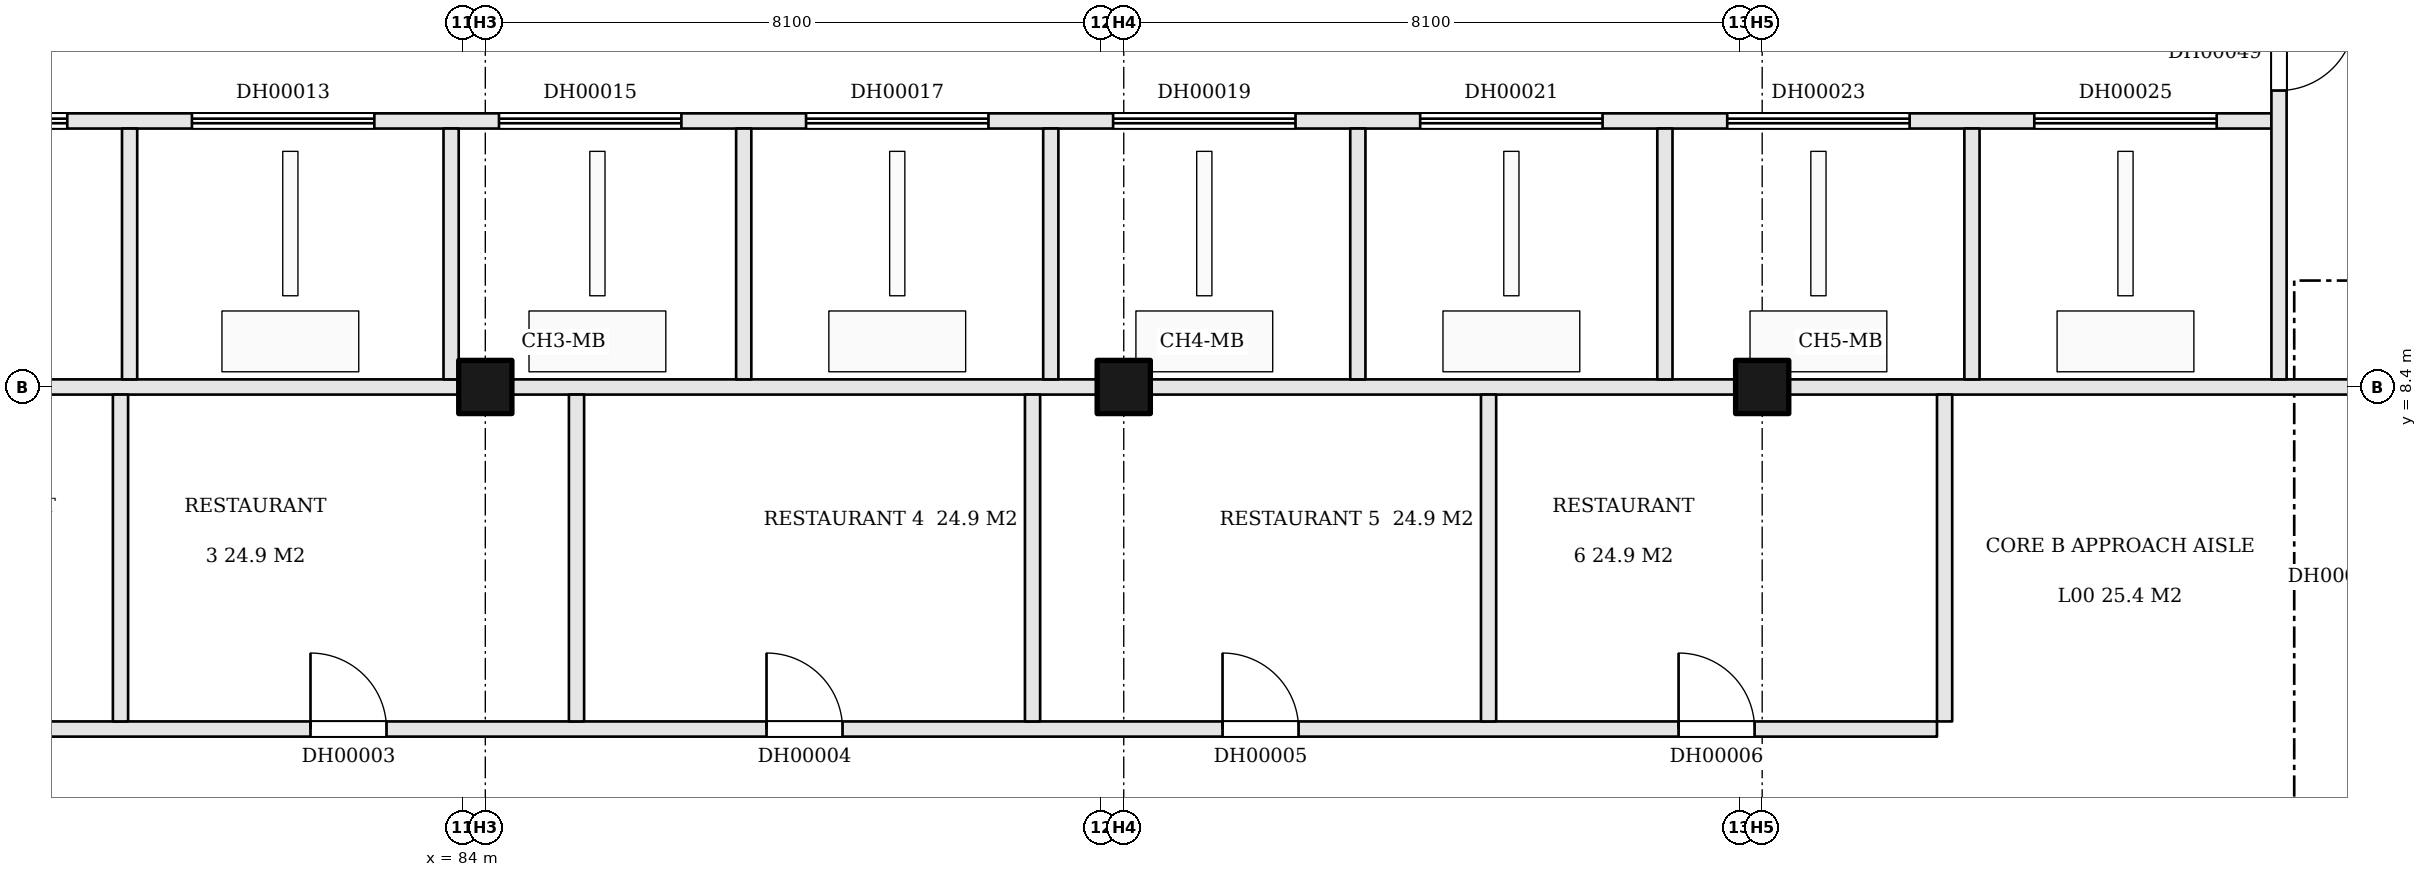
"""IFC4 building model, lengths in metres.
Left out: names, types, materials, properties, quantities, classifications, styles, units other than length and angle.
Written with IfcOpenShell. Run it as: python <this file> out.ifc"""

import sys

from ifc_helpers import new_model, si_unit, direction, frame, frame_2d, origin, origin_2d, place, context, subcontext, project, spatial, rectangle, extrude, element, fill, save


model = new_model("IFC4")
c1 = context("Model", 3, precision=1e-05, world=origin(), true_north=direction((0.0, 1.0)))
c2 = subcontext(c1, "Body", "Model", "MODEL_VIEW")
j1 = project(units=[si_unit("LENGTHUNIT", "METRE"), si_unit("PLANEANGLEUNIT", "RADIAN")], contexts=[c1])
p1 = place(None, origin())
s1 = spatial("IfcSite", under=j1, at=p1, CompositionType="ELEMENT")
p2 = place(p1, origin())
s2 = spatial("IfcBuilding", under=s1, at=p2, CompositionType="ELEMENT")
p3 = place(p2, origin())
s3 = spatial("IfcBuildingStorey", under=s2, at=p3, CompositionType="ELEMENT", Elevation=0.0)
for number, where, z_axis, x_axis in (
    (1, (84.3, 8.4, -0.2), (0.0, 0.0, 1.0), (1.0, 0.0, 0.0)),
    (2, (92.7, 8.4, -0.2), (0.0, 0.0, 1.0), (1.0, 0.0, 0.0)),
    (3, (101.1, 8.4, -0.2), (0.0, 0.0, 1.0), (1.0, 0.0, 0.0)),
):
    element("IfcColumn", number, at=place(p3, frame(where, z_axis=z_axis, x_axis=x_axis)), inside=s3, PredefinedType="COLUMN", context=c2, shape_type="SweptSolid", body=[
        extrude(rectangle(XDim=0.7, YDim=0.7, at=origin_2d()), origin(), (0.0, 0.0, 1.0), 8.9),
    ])
p4 = place(p3, frame((68.35, 3.9, 0.0), z_axis=(0.0, 0.0, 1.0), x_axis=(1.0, 0.0, 0.0)))
e4 = element("IfcWall", 4, at=p4, inside=s3, PredefinedType="PARTITIONING", context=c2, shape_type="SweptSolid", body=[
    extrude(rectangle(XDim=35.05, YDim=0.2, at=frame_2d((17.525, 0.0))), origin(), (0.0, 0.0, 1.0), 8.7),
])
p5 = place(p4, frame((1.65, 0.0, 0.0)))
e5 = element("IfcOpeningElement", 5, at=p5, cuts=e4, PredefinedType="OPENING", context=c2, shape_type="SweptSolid", body=[
    extrude(rectangle(XDim=1.0, YDim=2.1, at=frame_2d((0.5, 1.05))), frame((0.0, 0.11, 0.0), z_axis=(0.0, -1.0, 0.0), x_axis=(1.0, 0.0, 0.0)), (0.0, 0.0, 1.0), 0.22),
])
p6 = place(p4, frame((7.65, 0.0, 0.0)))
e6 = element("IfcOpeningElement", 6, at=p6, cuts=e4, PredefinedType="OPENING", context=c2, shape_type="SweptSolid", body=[
    extrude(rectangle(XDim=1.0, YDim=2.1, at=frame_2d((0.5, 1.05))), frame((0.0, 0.11, 0.0), z_axis=(0.0, -1.0, 0.0), x_axis=(1.0, 0.0, 0.0)), (0.0, 0.0, 1.0), 0.22),
])
p7 = place(p4, frame((13.65, 0.0, 0.0)))
e7 = element("IfcOpeningElement", 7, at=p7, cuts=e4, PredefinedType="OPENING", context=c2, shape_type="SweptSolid", body=[
    extrude(rectangle(XDim=1.0, YDim=2.1, at=frame_2d((0.5, 1.05))), frame((0.0, 0.11, 0.0), z_axis=(0.0, -1.0, 0.0), x_axis=(1.0, 0.0, 0.0)), (0.0, 0.0, 1.0), 0.22),
])
p8 = place(p4, frame((19.65, 0.0, 0.0)))
e8 = element("IfcOpeningElement", 8, at=p8, cuts=e4, PredefinedType="OPENING", context=c2, shape_type="SweptSolid", body=[
    extrude(rectangle(XDim=1.0, YDim=2.1, at=frame_2d((0.5, 1.05))), frame((0.0, 0.11, 0.0), z_axis=(0.0, -1.0, 0.0), x_axis=(1.0, 0.0, 0.0)), (0.0, 0.0, 1.0), 0.22),
])
p9 = place(p4, frame((25.65, 0.0, 0.0)))
e9 = element("IfcOpeningElement", 9, at=p9, cuts=e4, PredefinedType="OPENING", context=c2, shape_type="SweptSolid", body=[
    extrude(rectangle(XDim=1.0, YDim=2.1, at=frame_2d((0.5, 1.05))), frame((0.0, 0.11, 0.0), z_axis=(0.0, -1.0, 0.0), x_axis=(1.0, 0.0, 0.0)), (0.0, 0.0, 1.0), 0.22),
])
p10 = place(p4, frame((31.65, 0.0, 0.0)))
e10 = element("IfcOpeningElement", 10, at=p10, cuts=e4, PredefinedType="OPENING", context=c2, shape_type="SweptSolid", body=[
    extrude(rectangle(XDim=1.0, YDim=2.1, at=frame_2d((0.5, 1.05))), frame((0.0, 0.11, 0.0), z_axis=(0.0, -1.0, 0.0), x_axis=(1.0, 0.0, 0.0)), (0.0, 0.0, 1.0), 0.22),
])
p11 = place(p3, frame((76.25, 8.4, 0.0), z_axis=(0.0, 0.0, 1.0), x_axis=(1.0, 0.0, 0.0)))
e11 = element("IfcWall", 11, at=p11, inside=s3, PredefinedType="PARTITIONING", context=c2, shape_type="SweptSolid", body=[
    extrude(rectangle(XDim=7.7, YDim=0.2, at=frame_2d((3.85, 0.0))), origin(), (0.0, 0.0, 1.0), 8.7),
])
p12 = place(p3, frame((84.65, 8.4, 0.0), z_axis=(0.0, 0.0, 1.0), x_axis=(1.0, 0.0, 0.0)))
e12 = element("IfcWall", 12, at=p12, inside=s3, PredefinedType="PARTITIONING", context=c2, shape_type="SweptSolid", body=[
    extrude(rectangle(XDim=7.7, YDim=0.2, at=frame_2d((3.85, 0.0))), origin(), (0.0, 0.0, 1.0), 8.7),
])
for number, where, z_axis, x_axis in (
    (13, (93.05, 8.4, 0.0), (0.0, 0.0, 1.0), (1.0, 0.0, 0.0)),
    (14, (101.45, 8.4, 0.0), (0.0, 0.0, 1.0), (1.0, 0.0, 0.0)),
):
    element("IfcWall", number, at=place(p3, frame(where, z_axis=z_axis, x_axis=x_axis)), inside=s3, PredefinedType="PARTITIONING", context=c2, shape_type="SweptSolid", body=[
        extrude(rectangle(XDim=7.7, YDim=0.2, at=frame_2d((3.85, 0.0))), origin(), (0.0, 0.0, 1.0), 8.7),
    ])
p13 = place(p3, frame((68.35, 11.9, 0.0), z_axis=(0.0, 0.0, 1.0), x_axis=(1.0, 0.0, 0.0)))
e15 = element("IfcWall", 15, at=p13, inside=s3, PredefinedType="PARTITIONING", context=c2, shape_type="SweptSolid", body=[
    extrude(rectangle(XDim=39.45, YDim=0.2, at=frame_2d((19.725, 0.0))), origin(), (0.0, 0.0, 1.0), 8.7),
])
p14 = place(p13, frame((0.2, 0.0, 0.0)))
e16 = element("IfcOpeningElement", 16, at=p14, cuts=e15, PredefinedType="OPENING", context=c2, shape_type="SweptSolid", body=[
    extrude(rectangle(XDim=2.4, YDim=2.4, at=frame_2d((1.2, 1.2))), frame((0.0, 0.11, 0.0), z_axis=(0.0, -1.0, 0.0), x_axis=(1.0, 0.0, 0.0)), (0.0, 0.0, 1.0), 0.22),
])
p15 = place(p13, frame((4.01, 0.0, 0.0)))
e17 = element("IfcOpeningElement", 17, at=p15, cuts=e15, PredefinedType="OPENING", context=c2, shape_type="SweptSolid", body=[
    extrude(rectangle(XDim=2.4, YDim=2.4, at=frame_2d((1.2, 1.2))), frame((0.0, 0.11, 0.0), z_axis=(0.0, -1.0, 0.0), x_axis=(1.0, 0.0, 0.0)), (0.0, 0.0, 1.0), 0.22),
])
p16 = place(p13, frame((8.05, 0.0, 0.0)))
e18 = element("IfcOpeningElement", 18, at=p16, cuts=e15, PredefinedType="OPENING", context=c2, shape_type="SweptSolid", body=[
    extrude(rectangle(XDim=2.4, YDim=2.4, at=frame_2d((1.2, 1.2))), frame((0.0, 0.11, 0.0), z_axis=(0.0, -1.0, 0.0), x_axis=(1.0, 0.0, 0.0)), (0.0, 0.0, 1.0), 0.22),
])
p17 = place(p13, frame((12.09, 0.0, 0.0)))
e19 = element("IfcOpeningElement", 19, at=p17, cuts=e15, PredefinedType="OPENING", context=c2, shape_type="SweptSolid", body=[
    extrude(rectangle(XDim=2.4, YDim=2.4, at=frame_2d((1.2, 1.2))), frame((0.0, 0.11, 0.0), z_axis=(0.0, -1.0, 0.0), x_axis=(1.0, 0.0, 0.0)), (0.0, 0.0, 1.0), 0.22),
])
p18 = place(p13, frame((16.13, 0.0, 0.0)))
e20 = element("IfcOpeningElement", 20, at=p18, cuts=e15, PredefinedType="OPENING", context=c2, shape_type="SweptSolid", body=[
    extrude(rectangle(XDim=2.4, YDim=2.4, at=frame_2d((1.2, 1.2))), frame((0.0, 0.11, 0.0), z_axis=(0.0, -1.0, 0.0), x_axis=(1.0, 0.0, 0.0)), (0.0, 0.0, 1.0), 0.22),
])
p19 = place(p13, frame((20.17, 0.0, 0.0)))
e21 = element("IfcOpeningElement", 21, at=p19, cuts=e15, PredefinedType="OPENING", context=c2, shape_type="SweptSolid", body=[
    extrude(rectangle(XDim=2.4, YDim=2.4, at=frame_2d((1.2, 1.2))), frame((0.0, 0.11, 0.0), z_axis=(0.0, -1.0, 0.0), x_axis=(1.0, 0.0, 0.0)), (0.0, 0.0, 1.0), 0.22),
])
p20 = place(p13, frame((24.21, 0.0, 0.0)))
e22 = element("IfcOpeningElement", 22, at=p20, cuts=e15, PredefinedType="OPENING", context=c2, shape_type="SweptSolid", body=[
    extrude(rectangle(XDim=2.4, YDim=2.4, at=frame_2d((1.2, 1.2))), frame((0.0, 0.11, 0.0), z_axis=(0.0, -1.0, 0.0), x_axis=(1.0, 0.0, 0.0)), (0.0, 0.0, 1.0), 0.22),
])
p21 = place(p13, frame((28.25, 0.0, 0.0)))
e23 = element("IfcOpeningElement", 23, at=p21, cuts=e15, PredefinedType="OPENING", context=c2, shape_type="SweptSolid", body=[
    extrude(rectangle(XDim=2.4, YDim=2.4, at=frame_2d((1.2, 1.2))), frame((0.0, 0.11, 0.0), z_axis=(0.0, -1.0, 0.0), x_axis=(1.0, 0.0, 0.0)), (0.0, 0.0, 1.0), 0.22),
])
p22 = place(p13, frame((32.29, 0.0, 0.0)))
e24 = element("IfcOpeningElement", 24, at=p22, cuts=e15, PredefinedType="OPENING", context=c2, shape_type="SweptSolid", body=[
    extrude(rectangle(XDim=2.4, YDim=2.4, at=frame_2d((1.2, 1.2))), frame((0.0, 0.11, 0.0), z_axis=(0.0, -1.0, 0.0), x_axis=(1.0, 0.0, 0.0)), (0.0, 0.0, 1.0), 0.22),
])
p23 = place(p13, frame((36.33, 0.0, 0.0)))
e25 = element("IfcOpeningElement", 25, at=p23, cuts=e15, PredefinedType="OPENING", context=c2, shape_type="SweptSolid", body=[
    extrude(rectangle(XDim=2.4, YDim=2.4, at=frame_2d((1.2, 1.2))), frame((0.0, 0.11, 0.0), z_axis=(0.0, -1.0, 0.0), x_axis=(1.0, 0.0, 0.0)), (0.0, 0.0, 1.0), 0.22),
])
p24 = place(p3, frame((79.5, 4.0, 0.0), z_axis=(0.0, 0.0, 1.0), x_axis=(0.0, 1.0, 0.0)))
e26 = element("IfcWall", 26, at=p24, inside=s3, PredefinedType="PARTITIONING", context=c2, shape_type="SweptSolid", body=[
    extrude(rectangle(XDim=4.3, YDim=0.2, at=frame_2d((2.15, 0.0))), origin(), (0.0, 0.0, 1.0), 8.7),
])
for number, where, z_axis, x_axis in (
    (27, (79.62, 8.5, 0.0), (0.0, 0.0, 1.0), (0.0, 1.0, 0.0)),
    (28, (83.85, 8.5, 0.0), (0.0, 0.0, 1.0), (0.0, 1.0, 0.0)),
):
    element("IfcWall", number, at=place(p3, frame(where, z_axis=z_axis, x_axis=x_axis)), inside=s3, PredefinedType="PARTITIONING", context=c2, shape_type="SweptSolid", body=[
        extrude(rectangle(XDim=3.3, YDim=0.2, at=frame_2d((1.65, 0.0))), origin(), (0.0, 0.0, 1.0), 8.7),
    ])
p25 = place(p3, frame((85.5, 4.0, 0.0), z_axis=(0.0, 0.0, 1.0), x_axis=(0.0, 1.0, 0.0)))
e29 = element("IfcWall", 29, at=p25, inside=s3, PredefinedType="PARTITIONING", context=c2, shape_type="SweptSolid", body=[
    extrude(rectangle(XDim=4.3, YDim=0.2, at=frame_2d((2.15, 0.0))), origin(), (0.0, 0.0, 1.0), 8.7),
])
p26 = place(p3, frame((87.7, 8.5, 0.0), z_axis=(0.0, 0.0, 1.0), x_axis=(0.0, 1.0, 0.0)))
e30 = element("IfcWall", 30, at=p26, inside=s3, PredefinedType="PARTITIONING", context=c2, shape_type="SweptSolid", body=[
    extrude(rectangle(XDim=3.3, YDim=0.2, at=frame_2d((1.65, 0.0))), origin(), (0.0, 0.0, 1.0), 8.7),
])
p27 = place(p3, frame((91.5, 4.0, 0.0), z_axis=(0.0, 0.0, 1.0), x_axis=(0.0, 1.0, 0.0)))
e31 = element("IfcWall", 31, at=p27, inside=s3, PredefinedType="PARTITIONING", context=c2, shape_type="SweptSolid", body=[
    extrude(rectangle(XDim=4.3, YDim=0.2, at=frame_2d((2.15, 0.0))), origin(), (0.0, 0.0, 1.0), 8.7),
])
for number, where, z_axis, x_axis in (
    (32, (91.74, 8.5, 0.0), (0.0, 0.0, 1.0), (0.0, 1.0, 0.0)),
    (33, (95.78, 8.5, 0.0), (0.0, 0.0, 1.0), (0.0, 1.0, 0.0)),
):
    element("IfcWall", number, at=place(p3, frame(where, z_axis=z_axis, x_axis=x_axis)), inside=s3, PredefinedType="PARTITIONING", context=c2, shape_type="SweptSolid", body=[
        extrude(rectangle(XDim=3.3, YDim=0.2, at=frame_2d((1.65, 0.0))), origin(), (0.0, 0.0, 1.0), 8.7),
    ])
p28 = place(p3, frame((97.5, 4.0, 0.0), z_axis=(0.0, 0.0, 1.0), x_axis=(0.0, 1.0, 0.0)))
e34 = element("IfcWall", 34, at=p28, inside=s3, PredefinedType="PARTITIONING", context=c2, shape_type="SweptSolid", body=[
    extrude(rectangle(XDim=4.3, YDim=0.2, at=frame_2d((2.15, 0.0))), origin(), (0.0, 0.0, 1.0), 8.7),
])
p29 = place(p3, frame((99.82, 8.5, 0.0), z_axis=(0.0, 0.0, 1.0), x_axis=(0.0, 1.0, 0.0)))
e35 = element("IfcWall", 35, at=p29, inside=s3, PredefinedType="PARTITIONING", context=c2, shape_type="SweptSolid", body=[
    extrude(rectangle(XDim=3.3, YDim=0.2, at=frame_2d((1.65, 0.0))), origin(), (0.0, 0.0, 1.0), 8.7),
])
p30 = place(p3, frame((103.5, 4.0, 0.0), z_axis=(0.0, 0.0, 1.0), x_axis=(0.0, 1.0, 0.0)))
e36 = element("IfcWall", 36, at=p30, inside=s3, PredefinedType="PARTITIONING", context=c2, shape_type="SweptSolid", body=[
    extrude(rectangle(XDim=4.3, YDim=0.2, at=frame_2d((2.15, 0.0))), origin(), (0.0, 0.0, 1.0), 8.7),
])
p31 = place(p3, frame((103.86, 8.5, 0.0), z_axis=(0.0, 0.0, 1.0), x_axis=(0.0, 1.0, 0.0)))
e37 = element("IfcWall", 37, at=p31, inside=s3, PredefinedType="PARTITIONING", context=c2, shape_type="SweptSolid", body=[
    extrude(rectangle(XDim=3.3, YDim=0.2, at=frame_2d((1.65, 0.0))), origin(), (0.0, 0.0, 1.0), 8.7),
])
p32 = place(p3, frame((107.9, 8.5, 0.0), z_axis=(0.0, 0.0, 1.0), x_axis=(0.0, 1.0, 0.0)))
e38 = element("IfcWall", 38, at=p32, inside=s3, PredefinedType="PARTITIONING", context=c2, shape_type="SweptSolid", body=[
    extrude(rectangle(XDim=25.1, YDim=0.2, at=frame_2d((12.55, 0.0))), origin(), (0.0, 0.0, 1.0), 8.7),
])
p33 = place(p32, frame((3.8, 0.0, 0.0)))
e39 = element("IfcOpeningElement", 39, at=p33, cuts=e38, PredefinedType="OPENING", context=c2, shape_type="SweptSolid", body=[
    extrude(rectangle(XDim=1.0, YDim=2.1, at=frame_2d((0.5, 1.05))), frame((0.0, 0.11, 0.0), z_axis=(0.0, -1.0, 0.0), x_axis=(1.0, 0.0, 0.0)), (0.0, 0.0, 1.0), 0.22),
])
p34 = place(p32, frame((10.0, 0.0, 0.0)))
e40 = element("IfcOpeningElement", 40, at=p34, cuts=e38, PredefinedType="OPENING", context=c2, shape_type="SweptSolid", body=[
    extrude(rectangle(XDim=1.0, YDim=2.1, at=frame_2d((0.5, 1.05))), frame((0.0, 0.11, 0.0), z_axis=(0.0, -1.0, 0.0), x_axis=(1.0, 0.0, 0.0)), (0.0, 0.0, 1.0), 0.22),
])
p35 = place(p32, frame((22.5, 0.0, 0.0)))
e41 = element("IfcOpeningElement", 41, at=p35, cuts=e38, PredefinedType="OPENING", context=c2, shape_type="SweptSolid", body=[
    extrude(rectangle(XDim=1.0, YDim=2.1, at=frame_2d((0.5, 1.05))), frame((0.0, 0.11, 0.0), z_axis=(0.0, -1.0, 0.0), x_axis=(1.0, 0.0, 0.0)), (0.0, 0.0, 1.0), 0.22),
])
p36 = place(p7, origin())
e42 = element("IfcDoor", 42, at=p36, inside=s3, OperationType="SINGLE_SWING_LEFT", PredefinedType="DOOR", context=c2, shape_type="SweptSolid", body=[
    extrude(rectangle(XDim=1.0, YDim=2.1, at=frame_2d((0.5, 1.05))), frame((0.0, 0.025, 0.0), z_axis=(0.0, -1.0, 0.0), x_axis=(1.0, 0.0, 0.0)), (0.0, 0.0, 1.0), 0.05),
])
fill(e7, e42)
p37 = place(p8, origin())
e43 = element("IfcDoor", 43, at=p37, inside=s3, OperationType="SINGLE_SWING_LEFT", PredefinedType="DOOR", context=c2, shape_type="SweptSolid", body=[
    extrude(rectangle(XDim=1.0, YDim=2.1, at=frame_2d((0.5, 1.05))), frame((0.0, 0.025, 0.0), z_axis=(0.0, -1.0, 0.0), x_axis=(1.0, 0.0, 0.0)), (0.0, 0.0, 1.0), 0.05),
])
fill(e8, e43)
p38 = place(p9, origin())
e44 = element("IfcDoor", 44, at=p38, inside=s3, OperationType="SINGLE_SWING_LEFT", PredefinedType="DOOR", context=c2, shape_type="SweptSolid", body=[
    extrude(rectangle(XDim=1.0, YDim=2.1, at=frame_2d((0.5, 1.05))), frame((0.0, 0.025, 0.0), z_axis=(0.0, -1.0, 0.0), x_axis=(1.0, 0.0, 0.0)), (0.0, 0.0, 1.0), 0.05),
])
fill(e9, e44)
p39 = place(p10, origin())
e45 = element("IfcDoor", 45, at=p39, inside=s3, OperationType="SINGLE_SWING_LEFT", PredefinedType="DOOR", context=c2, shape_type="SweptSolid", body=[
    extrude(rectangle(XDim=1.0, YDim=2.1, at=frame_2d((0.5, 1.05))), frame((0.0, 0.025, 0.0), z_axis=(0.0, -1.0, 0.0), x_axis=(1.0, 0.0, 0.0)), (0.0, 0.0, 1.0), 0.05),
])
fill(e10, e45)
p40 = place(p16, origin())
e46 = element("IfcDoor", 46, at=p40, inside=s3, OperationType="ROLLINGUP", PredefinedType="DOOR", context=c2, shape_type="SweptSolid", body=[
    extrude(rectangle(XDim=2.4, YDim=2.4, at=frame_2d((1.2, 1.2))), frame((0.0, 0.025, 0.0), z_axis=(0.0, -1.0, 0.0), x_axis=(1.0, 0.0, 0.0)), (0.0, 0.0, 1.0), 0.05),
])
fill(e18, e46)
p41 = place(p17, origin())
e47 = element("IfcDoor", 47, at=p41, inside=s3, OperationType="ROLLINGUP", PredefinedType="DOOR", context=c2, shape_type="SweptSolid", body=[
    extrude(rectangle(XDim=2.4, YDim=2.4, at=frame_2d((1.2, 1.2))), frame((0.0, 0.025, 0.0), z_axis=(0.0, -1.0, 0.0), x_axis=(1.0, 0.0, 0.0)), (0.0, 0.0, 1.0), 0.05),
])
fill(e19, e47)
p42 = place(p18, origin())
e48 = element("IfcDoor", 48, at=p42, inside=s3, OperationType="ROLLINGUP", PredefinedType="DOOR", context=c2, shape_type="SweptSolid", body=[
    extrude(rectangle(XDim=2.4, YDim=2.4, at=frame_2d((1.2, 1.2))), frame((0.0, 0.025, 0.0), z_axis=(0.0, -1.0, 0.0), x_axis=(1.0, 0.0, 0.0)), (0.0, 0.0, 1.0), 0.05),
])
fill(e20, e48)
p43 = place(p19, origin())
e49 = element("IfcDoor", 49, at=p43, inside=s3, OperationType="ROLLINGUP", PredefinedType="DOOR", context=c2, shape_type="SweptSolid", body=[
    extrude(rectangle(XDim=2.4, YDim=2.4, at=frame_2d((1.2, 1.2))), frame((0.0, 0.025, 0.0), z_axis=(0.0, -1.0, 0.0), x_axis=(1.0, 0.0, 0.0)), (0.0, 0.0, 1.0), 0.05),
])
fill(e21, e49)
p44 = place(p20, origin())
e50 = element("IfcDoor", 50, at=p44, inside=s3, OperationType="ROLLINGUP", PredefinedType="DOOR", context=c2, shape_type="SweptSolid", body=[
    extrude(rectangle(XDim=2.4, YDim=2.4, at=frame_2d((1.2, 1.2))), frame((0.0, 0.025, 0.0), z_axis=(0.0, -1.0, 0.0), x_axis=(1.0, 0.0, 0.0)), (0.0, 0.0, 1.0), 0.05),
])
fill(e22, e50)
p45 = place(p21, origin())
e51 = element("IfcDoor", 51, at=p45, inside=s3, OperationType="ROLLINGUP", PredefinedType="DOOR", context=c2, shape_type="SweptSolid", body=[
    extrude(rectangle(XDim=2.4, YDim=2.4, at=frame_2d((1.2, 1.2))), frame((0.0, 0.025, 0.0), z_axis=(0.0, -1.0, 0.0), x_axis=(1.0, 0.0, 0.0)), (0.0, 0.0, 1.0), 0.05),
])
fill(e23, e51)
p46 = place(p22, origin())
e52 = element("IfcDoor", 52, at=p46, inside=s3, OperationType="ROLLINGUP", PredefinedType="DOOR", context=c2, shape_type="SweptSolid", body=[
    extrude(rectangle(XDim=2.4, YDim=2.4, at=frame_2d((1.2, 1.2))), frame((0.0, 0.025, 0.0), z_axis=(0.0, -1.0, 0.0), x_axis=(1.0, 0.0, 0.0)), (0.0, 0.0, 1.0), 0.05),
])
fill(e24, e52)
p47 = place(p23, origin())
e53 = element("IfcDoor", 53, at=p47, inside=s3, OperationType="ROLLINGUP", PredefinedType="DOOR", context=c2, shape_type="SweptSolid", body=[
    extrude(rectangle(XDim=2.4, YDim=2.4, at=frame_2d((1.2, 1.2))), frame((0.0, 0.025, 0.0), z_axis=(0.0, -1.0, 0.0), x_axis=(1.0, 0.0, 0.0)), (0.0, 0.0, 1.0), 0.05),
])
fill(e25, e53)
p48 = place(p33, frame((1.0, 0.0, 0.0), z_axis=(0.0, 0.0, 1.0), x_axis=(-1.0, 0.0, 0.0)))
e54 = element("IfcDoor", 54, at=p48, inside=s3, OperationType="SINGLE_SWING_LEFT", PredefinedType="DOOR", context=c2, shape_type="SweptSolid", body=[
    extrude(rectangle(XDim=1.0, YDim=2.1, at=frame_2d((0.5, 1.05))), frame((0.0, 0.025, 0.0), z_axis=(0.0, -1.0, 0.0), x_axis=(1.0, 0.0, 0.0)), (0.0, 0.0, 1.0), 0.05),
])
fill(e39, e54)
save(model, sys.argv[1])
